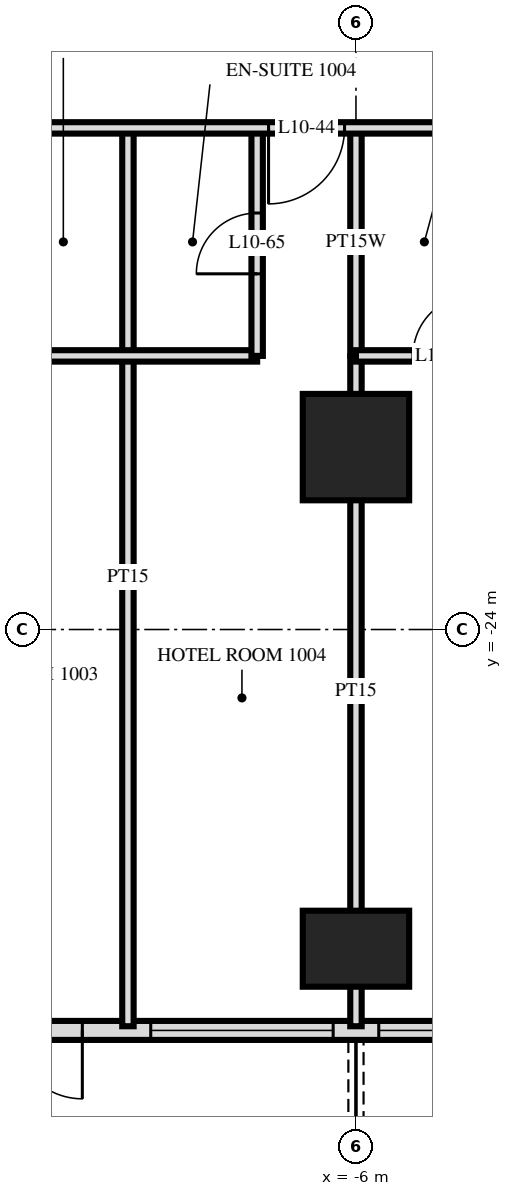
"""IFC4 building model, lengths in metres.
Left out: names, types, materials, properties, quantities, classifications, styles, units other than length and angle.
Written with IfcOpenShell. Run it as: python <this file> out.ifc"""

import sys

from ifc_helpers import new_model, si_unit, direction, frame, frame_2d, origin, origin_2d, place, context, subcontext, project, spatial, rectangle, extrude, element, fill, save


model = new_model("IFC4")
c1 = context("Model", 3, precision=1e-05, world=origin(), true_north=direction((0.0, 1.0)))
c2 = subcontext(c1, "Body", "Model", "MODEL_VIEW")
j1 = project(units=[si_unit("LENGTHUNIT", "METRE"), si_unit("PLANEANGLEUNIT", "RADIAN")], contexts=[c1])
p1 = place(None, origin())
s1 = spatial("IfcSite", under=j1, at=p1, CompositionType="ELEMENT")
p2 = place(p1, origin())
s2 = spatial("IfcBuilding", under=s1, at=p2, CompositionType="ELEMENT")
p3 = place(p2, frame((0.0, 0.0, 45.6)))
s3 = spatial("IfcBuildingStorey", under=s2, at=p3, CompositionType="ELEMENT", Elevation=45.6)
p4 = place(p3, frame((-6.0, -28.2, 0.0), z_axis=(0.0, 0.0, 1.0), x_axis=(1.0, 0.0, 0.0)))
e1 = element("IfcColumn", 1, at=p4, inside=s3, PredefinedType="COLUMN", context=c2, shape_type="SweptSolid", body=[
    extrude(rectangle(XDim=1.4, YDim=1.0, at=origin_2d()), origin(), (0.0, 0.0, 1.0), 3.6),
])
p5 = place(p3, frame((-6.0, -21.6, 0.0), z_axis=(0.0, 0.0, 1.0), x_axis=(1.0, 0.0, 0.0)))
e2 = element("IfcColumn", 2, at=p5, inside=s3, PredefinedType="COLUMN", context=c2, shape_type="SweptSolid", body=[
    extrude(rectangle(XDim=1.4, YDim=1.4, at=origin_2d()), origin(), (0.0, 0.0, 1.0), 3.6),
])
p6 = place(p3, frame((-28.775, -29.275, 0.0), z_axis=(0.0, 0.0, 1.0), x_axis=(1.0, 0.0, 0.0)))
e3 = element("IfcWall", 3, at=p6, inside=s3, PredefinedType="SOLIDWALL", context=c2, shape_type="SweptSolid", body=[
    extrude(rectangle(XDim=57.551, YDim=0.25, at=frame_2d((28.775, 0.0))), origin(), (0.0, 0.0, 1.0), 3.32),
])
p7 = place(p6, frame((0.575, 0.0, 0.0)))
e4 = element("IfcOpeningElement", 4, at=p7, cuts=e3, PredefinedType="OPENING", context=c2, shape_type="SweptSolid", body=[
    extrude(rectangle(XDim=1.8, YDim=2.4, at=frame_2d((0.9, 1.2))), frame((0.0, 0.135, 0.0), z_axis=(0.0, -1.0, 0.0), x_axis=(1.0, 0.0, 0.0)), (0.0, 0.0, 1.0), 0.27),
])
p8 = place(p6, frame((5.375, 0.0, 0.0)))
e5 = element("IfcOpeningElement", 5, at=p8, cuts=e3, PredefinedType="OPENING", context=c2, shape_type="SweptSolid", body=[
    extrude(rectangle(XDim=1.8, YDim=2.4, at=frame_2d((0.9, 1.2))), frame((0.0, 0.135, 0.0), z_axis=(0.0, -1.0, 0.0), x_axis=(1.0, 0.0, 0.0)), (0.0, 0.0, 1.0), 0.27),
])
p9 = place(p6, frame((8.075, 0.0, 0.3)))
e6 = element("IfcOpeningElement", 6, at=p9, cuts=e3, PredefinedType="OPENING", context=c2, shape_type="SweptSolid", body=[
    extrude(rectangle(XDim=2.4, YDim=2.1, at=frame_2d((1.2, 1.05))), frame((0.0, 0.135, 0.0), z_axis=(0.0, -1.0, 0.0), x_axis=(1.0, 0.0, 0.0)), (0.0, 0.0, 1.0), 0.27),
])
p10 = place(p6, frame((12.875, 0.0, 0.0)))
e7 = element("IfcOpeningElement", 7, at=p10, cuts=e3, PredefinedType="OPENING", context=c2, shape_type="SweptSolid", body=[
    extrude(rectangle(XDim=1.8, YDim=2.4, at=frame_2d((0.9, 1.2))), frame((0.0, 0.135, 0.0), z_axis=(0.0, -1.0, 0.0), x_axis=(1.0, 0.0, 0.0)), (0.0, 0.0, 1.0), 0.27),
])
p11 = place(p6, frame((17.375, 0.0, 0.0)))
e8 = element("IfcOpeningElement", 8, at=p11, cuts=e3, PredefinedType="OPENING", context=c2, shape_type="SweptSolid", body=[
    extrude(rectangle(XDim=1.8, YDim=2.4, at=frame_2d((0.9, 1.2))), frame((0.0, 0.135, 0.0), z_axis=(0.0, -1.0, 0.0), x_axis=(1.0, 0.0, 0.0)), (0.0, 0.0, 1.0), 0.27),
])
p12 = place(p6, frame((20.075, 0.0, 0.3)))
e9 = element("IfcOpeningElement", 9, at=p12, cuts=e3, PredefinedType="OPENING", context=c2, shape_type="SweptSolid", body=[
    extrude(rectangle(XDim=2.4, YDim=2.1, at=frame_2d((1.2, 1.05))), frame((0.0, 0.135, 0.0), z_axis=(0.0, -1.0, 0.0), x_axis=(1.0, 0.0, 0.0)), (0.0, 0.0, 1.0), 0.27),
])
p13 = place(p6, frame((23.075, 0.0, 0.3)))
e10 = element("IfcOpeningElement", 10, at=p13, cuts=e3, PredefinedType="OPENING", context=c2, shape_type="SweptSolid", body=[
    extrude(rectangle(XDim=2.4, YDim=2.1, at=frame_2d((1.2, 1.05))), frame((0.0, 0.135, 0.0), z_axis=(0.0, -1.0, 0.0), x_axis=(1.0, 0.0, 0.0)), (0.0, 0.0, 1.0), 0.27),
])
p14 = place(p6, frame((26.375, 0.0, 0.0)))
e11 = element("IfcOpeningElement", 11, at=p14, cuts=e3, PredefinedType="OPENING", context=c2, shape_type="SweptSolid", body=[
    extrude(rectangle(XDim=1.8, YDim=2.4, at=frame_2d((0.9, 1.2))), frame((0.0, 0.135, 0.0), z_axis=(0.0, -1.0, 0.0), x_axis=(1.0, 0.0, 0.0)), (0.0, 0.0, 1.0), 0.27),
])
p15 = place(p6, frame((29.075, 0.0, 0.3)))
e12 = element("IfcOpeningElement", 12, at=p15, cuts=e3, PredefinedType="OPENING", context=c2, shape_type="SweptSolid", body=[
    extrude(rectangle(XDim=2.4, YDim=2.1, at=frame_2d((1.2, 1.05))), frame((0.0, 0.135, 0.0), z_axis=(0.0, -1.0, 0.0), x_axis=(1.0, 0.0, 0.0)), (0.0, 0.0, 1.0), 0.27),
])
p16 = place(p6, frame((32.375, 0.0, 0.0)))
e13 = element("IfcOpeningElement", 13, at=p16, cuts=e3, PredefinedType="OPENING", context=c2, shape_type="SweptSolid", body=[
    extrude(rectangle(XDim=1.8, YDim=2.4, at=frame_2d((0.9, 1.2))), frame((0.0, 0.135, 0.0), z_axis=(0.0, -1.0, 0.0), x_axis=(1.0, 0.0, 0.0)), (0.0, 0.0, 1.0), 0.27),
])
p17 = place(p6, frame((35.375, 0.0, 0.0)))
e14 = element("IfcOpeningElement", 14, at=p17, cuts=e3, PredefinedType="OPENING", context=c2, shape_type="SweptSolid", body=[
    extrude(rectangle(XDim=1.8, YDim=2.4, at=frame_2d((0.9, 1.2))), frame((0.0, 0.135, 0.0), z_axis=(0.0, -1.0, 0.0), x_axis=(1.0, 0.0, 0.0)), (0.0, 0.0, 1.0), 0.27),
])
p18 = place(p6, frame((38.075, 0.0, 0.3)))
e15 = element("IfcOpeningElement", 15, at=p18, cuts=e3, PredefinedType="OPENING", context=c2, shape_type="SweptSolid", body=[
    extrude(rectangle(XDim=2.4, YDim=2.1, at=frame_2d((1.2, 1.05))), frame((0.0, 0.135, 0.0), z_axis=(0.0, -1.0, 0.0), x_axis=(1.0, 0.0, 0.0)), (0.0, 0.0, 1.0), 0.27),
])
p19 = place(p6, frame((41.075, 0.0, 0.3)))
e16 = element("IfcOpeningElement", 16, at=p19, cuts=e3, PredefinedType="OPENING", context=c2, shape_type="SweptSolid", body=[
    extrude(rectangle(XDim=2.4, YDim=2.1, at=frame_2d((1.2, 1.05))), frame((0.0, 0.135, 0.0), z_axis=(0.0, -1.0, 0.0), x_axis=(1.0, 0.0, 0.0)), (0.0, 0.0, 1.0), 0.27),
])
p20 = place(p6, frame((44.375, 0.0, 0.0)))
e17 = element("IfcOpeningElement", 17, at=p20, cuts=e3, PredefinedType="OPENING", context=c2, shape_type="SweptSolid", body=[
    extrude(rectangle(XDim=1.8, YDim=2.4, at=frame_2d((0.9, 1.2))), frame((0.0, 0.135, 0.0), z_axis=(0.0, -1.0, 0.0), x_axis=(1.0, 0.0, 0.0)), (0.0, 0.0, 1.0), 0.27),
])
p21 = place(p6, frame((47.075, 0.0, 0.3)))
e18 = element("IfcOpeningElement", 18, at=p21, cuts=e3, PredefinedType="OPENING", context=c2, shape_type="SweptSolid", body=[
    extrude(rectangle(XDim=2.4, YDim=2.1, at=frame_2d((1.2, 1.05))), frame((0.0, 0.135, 0.0), z_axis=(0.0, -1.0, 0.0), x_axis=(1.0, 0.0, 0.0)), (0.0, 0.0, 1.0), 0.27),
])
p22 = place(p6, frame((50.375, 0.0, 0.0)))
e19 = element("IfcOpeningElement", 19, at=p22, cuts=e3, PredefinedType="OPENING", context=c2, shape_type="SweptSolid", body=[
    extrude(rectangle(XDim=1.8, YDim=2.4, at=frame_2d((0.9, 1.2))), frame((0.0, 0.135, 0.0), z_axis=(0.0, -1.0, 0.0), x_axis=(1.0, 0.0, 0.0)), (0.0, 0.0, 1.0), 0.27),
])
p23 = place(p6, frame((53.375, 0.0, 0.0)))
e20 = element("IfcOpeningElement", 20, at=p23, cuts=e3, PredefinedType="OPENING", context=c2, shape_type="SweptSolid", body=[
    extrude(rectangle(XDim=1.8, YDim=2.4, at=frame_2d((0.9, 1.2))), frame((0.0, 0.135, 0.0), z_axis=(0.0, -1.0, 0.0), x_axis=(1.0, 0.0, 0.0)), (0.0, 0.0, 1.0), 0.27),
])
p24 = place(p3, frame((-6.0, -29.22, 0.0), z_axis=(0.0, 0.0, 1.0), x_axis=(0.0, 1.0, 0.0)))
e21 = element("IfcWall", 21, at=p24, inside=s3, PredefinedType="PARTITIONING", context=c2, shape_type="SweptSolid", body=[
    extrude(rectangle(XDim=8.82, YDim=0.15, at=frame_2d((4.41, 0.0))), origin(), (0.0, 0.0, 1.0), 3.32),
])
p25 = place(p3, frame((-6.0, -20.4, 0.0), z_axis=(0.0, 0.0, 1.0), x_axis=(0.0, 1.0, 0.0)))
e22 = element("IfcWall", 22, at=p25, inside=s3, PredefinedType="PLUMBINGWALL", context=c2, shape_type="SweptSolid", body=[
    extrude(rectangle(XDim=3.0, YDim=0.15, at=frame_2d((1.5, 0.0))), origin(), (0.0, 0.0, 1.0), 3.32),
])
p26 = place(p3, frame((-7.3, -20.4, 0.0), z_axis=(0.0, 0.0, 1.0), x_axis=(0.0, 1.0, 0.0)))
e23 = element("IfcWall", 23, at=p26, inside=s3, PredefinedType="PARTITIONING", context=c2, shape_type="SweptSolid", body=[
    extrude(rectangle(XDim=3.0, YDim=0.15, at=frame_2d((1.5, 0.0))), origin(), (0.0, 0.0, 1.0), 3.32),
])
p27 = place(p26, frame((1.08, 0.0, 0.0)))
e24 = element("IfcOpeningElement", 24, at=p27, cuts=e23, PredefinedType="OPENING", context=c2, shape_type="SweptSolid", body=[
    extrude(rectangle(XDim=0.8, YDim=2.1, at=frame_2d((0.4, 1.05))), frame((0.0, 0.085, 0.0), z_axis=(0.0, -1.0, 0.0), x_axis=(1.0, 0.0, 0.0)), (0.0, 0.0, 1.0), 0.17),
])
p28 = place(p3, frame((-9.0, -29.22, 0.0), z_axis=(0.0, 0.0, 1.0), x_axis=(0.0, 1.0, 0.0)))
e25 = element("IfcWall", 25, at=p28, inside=s3, PredefinedType="PARTITIONING", context=c2, shape_type="SweptSolid", body=[
    extrude(rectangle(XDim=11.82, YDim=0.15, at=frame_2d((5.91, 0.0))), origin(), (0.0, 0.0, 1.0), 3.32),
])
p29 = place(p3, frame((-10.7, -20.4, 0.0), z_axis=(0.0, 0.0, 1.0), x_axis=(1.0, 0.0, 0.0)))
e26 = element("IfcWall", 26, at=p29, inside=s3, PredefinedType="PARTITIONING", context=c2, shape_type="SweptSolid", body=[
    extrude(rectangle(XDim=3.4, YDim=0.15, at=frame_2d((1.7, 0.0))), origin(), (0.0, 0.0, 1.0), 3.32),
])
p30 = place(p3, frame((-6.0, -20.4, 0.0), z_axis=(0.0, 0.0, 1.0), x_axis=(1.0, 0.0, 0.0)))
e27 = element("IfcWall", 27, at=p30, inside=s3, PredefinedType="PLUMBINGWALL", context=c2, shape_type="SweptSolid", body=[
    extrude(rectangle(XDim=1.8, YDim=0.15, at=frame_2d((0.9, 0.0))), origin(), (0.0, 0.0, 1.0), 3.32),
])
p31 = place(p30, frame((0.75, 0.0, 0.0)))
e28 = element("IfcOpeningElement", 28, at=p31, cuts=e27, PredefinedType="OPENING", context=c2, shape_type="SweptSolid", body=[
    extrude(rectangle(XDim=0.8, YDim=2.1, at=frame_2d((0.4, 1.05))), frame((0.0, 0.085, 0.0), z_axis=(0.0, -1.0, 0.0), x_axis=(1.0, 0.0, 0.0)), (0.0, 0.0, 1.0), 0.17),
])
p32 = place(p3, frame((-33.12, -17.4, 0.0), z_axis=(0.0, 0.0, 1.0), x_axis=(1.0, 0.0, 0.0)))
e29 = element("IfcWall", 29, at=p32, inside=s3, PredefinedType="PARTITIONING", context=c2, shape_type="SweptSolid", body=[
    extrude(rectangle(XDim=66.24, YDim=0.15, at=frame_2d((33.12, 0.0))), origin(), (0.0, 0.0, 1.0), 3.32),
])
p33 = place(p32, frame((9.27, 0.0, 0.0)))
e30 = element("IfcOpeningElement", 30, at=p33, cuts=e29, PredefinedType="OPENING", context=c2, shape_type="SweptSolid", body=[
    extrude(rectangle(XDim=1.0, YDim=2.1, at=frame_2d((0.5, 1.05))), frame((0.0, 0.085, 0.0), z_axis=(0.0, -1.0, 0.0), x_axis=(1.0, 0.0, 0.0)), (0.0, 0.0, 1.0), 0.17),
])
p34 = place(p32, frame((13.97, 0.0, 0.0)))
e31 = element("IfcOpeningElement", 31, at=p34, cuts=e29, PredefinedType="OPENING", context=c2, shape_type="SweptSolid", body=[
    extrude(rectangle(XDim=1.0, YDim=2.1, at=frame_2d((0.5, 1.05))), frame((0.0, 0.085, 0.0), z_axis=(0.0, -1.0, 0.0), x_axis=(1.0, 0.0, 0.0)), (0.0, 0.0, 1.0), 0.17),
])
p35 = place(p32, frame((17.62, 0.0, 0.0)))
e32 = element("IfcOpeningElement", 32, at=p35, cuts=e29, PredefinedType="OPENING", context=c2, shape_type="SweptSolid", body=[
    extrude(rectangle(XDim=1.0, YDim=2.1, at=frame_2d((0.5, 1.05))), frame((0.0, 0.085, 0.0), z_axis=(0.0, -1.0, 0.0), x_axis=(1.0, 0.0, 0.0)), (0.0, 0.0, 1.0), 0.17),
])
p36 = place(p32, frame((21.27, 0.0, 0.0)))
e33 = element("IfcOpeningElement", 33, at=p36, cuts=e29, PredefinedType="OPENING", context=c2, shape_type="SweptSolid", body=[
    extrude(rectangle(XDim=1.0, YDim=2.1, at=frame_2d((0.5, 1.05))), frame((0.0, 0.085, 0.0), z_axis=(0.0, -1.0, 0.0), x_axis=(1.0, 0.0, 0.0)), (0.0, 0.0, 1.0), 0.17),
])
p37 = place(p32, frame((25.97, 0.0, 0.0)))
e34 = element("IfcOpeningElement", 34, at=p37, cuts=e29, PredefinedType="OPENING", context=c2, shape_type="SweptSolid", body=[
    extrude(rectangle(XDim=1.0, YDim=2.1, at=frame_2d((0.5, 1.05))), frame((0.0, 0.085, 0.0), z_axis=(0.0, -1.0, 0.0), x_axis=(1.0, 0.0, 0.0)), (0.0, 0.0, 1.0), 0.17),
])
p38 = place(p32, frame((35.62, 0.0, 0.0)))
e35 = element("IfcOpeningElement", 35, at=p38, cuts=e29, PredefinedType="OPENING", context=c2, shape_type="SweptSolid", body=[
    extrude(rectangle(XDim=1.0, YDim=2.1, at=frame_2d((0.5, 1.05))), frame((0.0, 0.085, 0.0), z_axis=(0.0, -1.0, 0.0), x_axis=(1.0, 0.0, 0.0)), (0.0, 0.0, 1.0), 0.17),
])
p39 = place(p32, frame((40.97, 0.0, 0.0)))
e36 = element("IfcOpeningElement", 36, at=p39, cuts=e29, PredefinedType="OPENING", context=c2, shape_type="SweptSolid", body=[
    extrude(rectangle(XDim=1.0, YDim=2.1, at=frame_2d((0.5, 1.05))), frame((0.0, 0.085, 0.0), z_axis=(0.0, -1.0, 0.0), x_axis=(1.0, 0.0, 0.0)), (0.0, 0.0, 1.0), 0.17),
])
p40 = place(p32, frame((42.27, 0.0, 0.0)))
e37 = element("IfcOpeningElement", 37, at=p40, cuts=e29, PredefinedType="OPENING", context=c2, shape_type="SweptSolid", body=[
    extrude(rectangle(XDim=1.0, YDim=2.1, at=frame_2d((0.5, 1.05))), frame((0.0, 0.085, 0.0), z_axis=(0.0, -1.0, 0.0), x_axis=(1.0, 0.0, 0.0)), (0.0, 0.0, 1.0), 0.17),
])
p41 = place(p32, frame((49.72, 0.0, 0.0)))
e38 = element("IfcOpeningElement", 38, at=p41, cuts=e29, PredefinedType="OPENING", context=c2, shape_type="SweptSolid", body=[
    extrude(rectangle(XDim=1.0, YDim=2.1, at=frame_2d((0.5, 1.05))), frame((0.0, 0.085, 0.0), z_axis=(0.0, -1.0, 0.0), x_axis=(1.0, 0.0, 0.0)), (0.0, 0.0, 1.0), 0.17),
])
p42 = place(p32, frame((51.27, 0.0, 0.0)))
e39 = element("IfcOpeningElement", 39, at=p42, cuts=e29, PredefinedType="OPENING", context=c2, shape_type="SweptSolid", body=[
    extrude(rectangle(XDim=1.0, YDim=2.1, at=frame_2d((0.5, 1.05))), frame((0.0, 0.085, 0.0), z_axis=(0.0, -1.0, 0.0), x_axis=(1.0, 0.0, 0.0)), (0.0, 0.0, 1.0), 0.17),
])
p43 = place(p32, frame((4.42, 0.0, 0.0)))
e40 = element("IfcOpeningElement", 40, at=p43, cuts=e29, PredefinedType="OPENING", context=c2, shape_type="SweptSolid", body=[
    extrude(rectangle(XDim=1.0, YDim=2.1, at=frame_2d((0.5, 1.05))), frame((0.0, 0.085, 0.0), z_axis=(0.0, -1.0, 0.0), x_axis=(1.0, 0.0, 0.0)), (0.0, 0.0, 1.0), 0.17),
])
p44 = place(p32, frame((54.82, 0.0, 0.0)))
e41 = element("IfcOpeningElement", 41, at=p44, cuts=e29, PredefinedType="OPENING", context=c2, shape_type="SweptSolid", body=[
    extrude(rectangle(XDim=1.0, YDim=2.1, at=frame_2d((0.5, 1.05))), frame((0.0, 0.085, 0.0), z_axis=(0.0, -1.0, 0.0), x_axis=(1.0, 0.0, 0.0)), (0.0, 0.0, 1.0), 0.17),
])
p45 = place(p11, frame((0.9, 0.0, 0.0), z_axis=(0.0, 0.0, 1.0), x_axis=(-1.0, 0.0, 0.0)))
e42 = element("IfcDoor", 42, at=p45, inside=s3, OperationType="DOUBLE_DOOR_SINGLE_SWING", PredefinedType="DOOR", context=c2, shape_type="SweptSolid", body=[
    extrude(rectangle(XDim=1.8, YDim=2.4, at=frame_2d((0.0, 1.2))), frame((0.0, -0.025, 0.0), z_axis=(0.0, 1.0, 0.0), x_axis=(-1.0, 0.0, 0.0)), (0.0, 0.0, 1.0), 0.05),
])
fill(e8, e42)
p46 = place(p12, origin())
e43 = element("IfcWindow", 43, at=p46, inside=s3, PartitioningType="SINGLE_PANEL", PredefinedType="WINDOW", context=c2, shape_type="SweptSolid", body=[
    extrude(rectangle(XDim=2.4, YDim=2.1, at=frame_2d((1.2, 1.05))), frame((0.0, 0.03, 0.0), z_axis=(0.0, -1.0, 0.0), x_axis=(1.0, 0.0, 0.0)), (0.0, 0.0, 1.0), 0.06),
])
fill(e9, e43)
p47 = place(p13, origin())
e44 = element("IfcWindow", 44, at=p47, inside=s3, PartitioningType="SINGLE_PANEL", PredefinedType="WINDOW", context=c2, shape_type="SweptSolid", body=[
    extrude(rectangle(XDim=2.4, YDim=2.1, at=frame_2d((1.2, 1.05))), frame((0.0, 0.03, 0.0), z_axis=(0.0, -1.0, 0.0), x_axis=(1.0, 0.0, 0.0)), (0.0, 0.0, 1.0), 0.06),
])
fill(e10, e44)
p48 = place(p37, frame((0.5, 0.0, 0.0), z_axis=(0.0, 0.0, 1.0), x_axis=(-1.0, 0.0, 0.0)))
e45 = element("IfcDoor", 45, at=p48, inside=s3, OperationType="SINGLE_SWING_LEFT", PredefinedType="DOOR", context=c2, shape_type="SweptSolid", body=[
    extrude(rectangle(XDim=1.0, YDim=2.1, at=frame_2d((0.0, 1.05))), frame((0.0, -0.025, 0.0), z_axis=(0.0, 1.0, 0.0), x_axis=(-1.0, 0.0, 0.0)), (0.0, 0.0, 1.0), 0.05),
])
fill(e34, e45)
p49 = place(p27, origin())
e46 = element("IfcDoor", 46, at=p49, inside=s3, OperationType="SINGLE_SWING_RIGHT", PredefinedType="DOOR", context=c2, shape_type="SweptSolid", body=[
    extrude(rectangle(XDim=0.8, YDim=2.1, at=frame_2d((0.4, 1.05))), frame((0.0, 0.025, 0.0), z_axis=(0.0, -1.0, 0.0), x_axis=(1.0, 0.0, 0.0)), (0.0, 0.0, 1.0), 0.05),
])
fill(e24, e46)
p50 = place(p31, origin())
e47 = element("IfcDoor", 47, at=p50, inside=s3, OperationType="SINGLE_SWING_LEFT", PredefinedType="DOOR", context=c2, shape_type="SweptSolid", body=[
    extrude(rectangle(XDim=0.8, YDim=2.1, at=frame_2d((0.4, 1.05))), frame((0.0, 0.025, 0.0), z_axis=(0.0, -1.0, 0.0), x_axis=(1.0, 0.0, 0.0)), (0.0, 0.0, 1.0), 0.05),
])
fill(e28, e47)
save(model, sys.argv[1])
